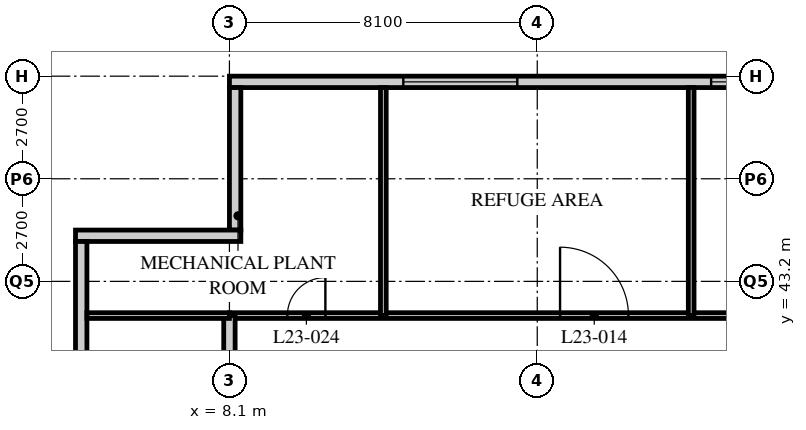
"""IFC4 building model, lengths in metres.
Left out: names, types, materials, properties, quantities, classifications, styles, units other than length and angle.
Written with IfcOpenShell. Run it as: python <this file> out.ifc"""

import sys

from ifc_helpers import new_model, si_unit, direction, frame, frame_2d, origin, place, context, subcontext, project, spatial, rectangle, extrude, element, fill, save


model = new_model("IFC4")
c1 = context("Model", 3, precision=1e-05, world=origin(), true_north=direction((0.0, 1.0)))
c2 = subcontext(c1, "Body", "Model", "MODEL_VIEW")
j1 = project(units=[si_unit("LENGTHUNIT", "METRE"), si_unit("PLANEANGLEUNIT", "RADIAN")], contexts=[c1])
p1 = place(None, origin())
s1 = spatial("IfcSite", under=j1, at=p1, CompositionType="ELEMENT")
p2 = place(p1, origin())
s2 = spatial("IfcBuilding", under=s1, at=p2, CompositionType="ELEMENT")
p3 = place(p2, frame((0.0, 0.0, 90.8)))
s3 = spatial("IfcBuildingStorey", under=s2, at=p3, CompositionType="ELEMENT", Elevation=90.8)
p4 = place(p3, frame((48.3, 48.45, 0.0), z_axis=(0.0, 0.0, 1.0), x_axis=(-1.0, 0.0, 0.0)))
e1 = element("IfcWall", 1, at=p4, inside=s3, PredefinedType="SOLIDWALL", context=c2, shape_type="SweptSolid", body=[
    extrude(rectangle(XDim=40.2, YDim=0.3, at=frame_2d((20.1, 0.0))), origin(), (0.0, 0.0, 1.0), 5.85),
])
p5 = place(p4, frame((4.275, 0.0, 1.0)))
e2 = element("IfcOpeningElement", 2, at=p5, cuts=e1, PredefinedType="OPENING", context=c2, shape_type="SweptSolid", body=[
    extrude(rectangle(XDim=3.0, YDim=1.7, at=frame_2d((1.5, 0.85))), frame((0.0, 0.16, 0.0), z_axis=(0.0, -1.0, 0.0), x_axis=(1.0, 0.0, 0.0)), (0.0, 0.0, 1.0), 0.32),
])
p6 = place(p4, frame((12.375, 0.0, 1.0)))
e3 = element("IfcOpeningElement", 3, at=p6, cuts=e1, PredefinedType="OPENING", context=c2, shape_type="SweptSolid", body=[
    extrude(rectangle(XDim=3.0, YDim=1.7, at=frame_2d((1.5, 0.85))), frame((0.0, 0.16, 0.0), z_axis=(0.0, -1.0, 0.0), x_axis=(1.0, 0.0, 0.0)), (0.0, 0.0, 1.0), 0.32),
])
p7 = place(p4, frame((24.525, 0.0, 1.0)))
e4 = element("IfcOpeningElement", 4, at=p7, cuts=e1, PredefinedType="OPENING", context=c2, shape_type="SweptSolid", body=[
    extrude(rectangle(XDim=3.0, YDim=1.7, at=frame_2d((1.5, 0.85))), frame((0.0, 0.16, 0.0), z_axis=(0.0, -1.0, 0.0), x_axis=(1.0, 0.0, 0.0)), (0.0, 0.0, 1.0), 0.32),
])
p8 = place(p4, frame((32.625, 0.0, 1.0)))
e5 = element("IfcOpeningElement", 5, at=p8, cuts=e1, PredefinedType="OPENING", context=c2, shape_type="SweptSolid", body=[
    extrude(rectangle(XDim=3.0, YDim=1.7, at=frame_2d((1.5, 0.85))), frame((0.0, 0.16, 0.0), z_axis=(0.0, -1.0, 0.0), x_axis=(1.0, 0.0, 0.0)), (0.0, 0.0, 1.0), 0.32),
])
p9 = place(p3, frame((8.25, 48.3, 0.0), z_axis=(0.0, 0.0, 1.0), x_axis=(0.0, -1.0, 0.0)))
e6 = element("IfcWall", 6, at=p9, inside=s3, PredefinedType="SOLIDWALL", context=c2, shape_type="SweptSolid", body=[
    extrude(rectangle(XDim=3.75, YDim=0.3, at=frame_2d((1.875, 0.0))), origin(), (0.0, 0.0, 1.0), 5.85),
])
p10 = place(p3, frame((8.4, 44.4, 0.0), z_axis=(0.0, 0.0, 1.0), x_axis=(-1.0, 0.0, 0.0)))
e7 = element("IfcWall", 7, at=p10, inside=s3, PredefinedType="SOLIDWALL", context=c2, shape_type="SweptSolid", body=[
    extrude(rectangle(XDim=4.35, YDim=0.3, at=frame_2d((2.175, 0.0))), origin(), (0.0, 0.0, 1.0), 6.95),
])
p11 = place(p3, frame((4.2, 44.25, 0.0), z_axis=(0.0, 0.0, 1.0), x_axis=(0.0, -1.0, 0.0)))
e8 = element("IfcWall", 8, at=p11, inside=s3, PredefinedType="SOLIDWALL", context=c2, shape_type="SweptSolid", body=[
    extrude(rectangle(XDim=3.75, YDim=0.3, at=frame_2d((1.875, 0.0))), origin(), (0.0, 0.0, 1.0), 6.95),
])
p12 = place(p3, frame((8.1, 42.3, 0.0), z_axis=(0.0, 0.0, 1.0), x_axis=(1.0, 0.0, 0.0)))
e9 = element("IfcWall", 9, at=p12, inside=s3, PredefinedType="PARTITIONING", context=c2, shape_type="SweptSolid", body=[
    extrude(rectangle(XDim=40.5, YDim=0.15, at=frame_2d((20.25, 0.0))), origin(), (0.0, 0.0, 1.0), 6.95),
])
p13 = place(p12, frame((8.7, 0.0, 0.0)))
e10 = element("IfcOpeningElement", 10, at=p13, cuts=e9, PredefinedType="OPENING", context=c2, shape_type="SweptSolid", body=[
    extrude(rectangle(XDim=1.8, YDim=2.4, at=frame_2d((0.9, 1.2))), frame((0.0, 0.085, 0.0), z_axis=(0.0, -1.0, 0.0), x_axis=(1.0, 0.0, 0.0)), (0.0, 0.0, 1.0), 0.17),
])
p14 = place(p12, frame((19.35, 0.0, 0.0)))
e11 = element("IfcOpeningElement", 11, at=p14, cuts=e9, PredefinedType="OPENING", context=c2, shape_type="SweptSolid", body=[
    extrude(rectangle(XDim=1.8, YDim=2.4, at=frame_2d((0.9, 1.2))), frame((0.0, 0.085, 0.0), z_axis=(0.0, -1.0, 0.0), x_axis=(1.0, 0.0, 0.0)), (0.0, 0.0, 1.0), 0.17),
])
p15 = place(p12, frame((33.0, 0.0, 0.0)))
e12 = element("IfcOpeningElement", 12, at=p15, cuts=e9, PredefinedType="OPENING", context=c2, shape_type="SweptSolid", body=[
    extrude(rectangle(XDim=1.8, YDim=2.4, at=frame_2d((0.9, 1.2))), frame((0.0, 0.085, 0.0), z_axis=(0.0, -1.0, 0.0), x_axis=(1.0, 0.0, 0.0)), (0.0, 0.0, 1.0), 0.17),
])
p16 = place(p12, frame((37.975, 0.0, 0.0)))
e13 = element("IfcOpeningElement", 13, at=p16, cuts=e9, PredefinedType="OPENING", context=c2, shape_type="SweptSolid", body=[
    extrude(rectangle(XDim=1.0, YDim=2.1, at=frame_2d((0.5, 1.05))), frame((0.0, 0.085, 0.0), z_axis=(0.0, -1.0, 0.0), x_axis=(1.0, 0.0, 0.0)), (0.0, 0.0, 1.0), 0.17),
])
p17 = place(p12, frame((1.525, 0.0, 0.0)))
e14 = element("IfcOpeningElement", 14, at=p17, cuts=e9, PredefinedType="OPENING", context=c2, shape_type="SweptSolid", body=[
    extrude(rectangle(XDim=1.0, YDim=2.1, at=frame_2d((0.5, 1.05))), frame((0.0, 0.085, 0.0), z_axis=(0.0, -1.0, 0.0), x_axis=(1.0, 0.0, 0.0)), (0.0, 0.0, 1.0), 0.17),
])
p18 = place(p3, frame((8.1, 8.1, 0.0), z_axis=(0.0, 0.0, 1.0), x_axis=(0.0, 1.0, 0.0)))
e15 = element("IfcWall", 15, at=p18, inside=s3, PredefinedType="PARTITIONING", context=c2, shape_type="SweptSolid", body=[
    extrude(rectangle(XDim=34.2, YDim=0.3, at=frame_2d((17.1, 0.0))), origin(), (0.0, 0.0, 1.0), 5.85),
])
p19 = place(p18, frame((2.95, 0.0, 0.0)))
e16 = element("IfcOpeningElement", 16, at=p19, cuts=e15, PredefinedType="OPENING", context=c2, shape_type="SweptSolid", body=[
    extrude(rectangle(XDim=1.8, YDim=2.4, at=frame_2d((0.9, 1.2))), frame((0.0, 0.16, 0.0), z_axis=(0.0, -1.0, 0.0), x_axis=(1.0, 0.0, 0.0)), (0.0, 0.0, 1.0), 0.32),
])
p20 = place(p18, frame((27.3, 0.0, 0.0)))
e17 = element("IfcOpeningElement", 17, at=p20, cuts=e15, PredefinedType="OPENING", context=c2, shape_type="SweptSolid", body=[
    extrude(rectangle(XDim=1.8, YDim=2.4, at=frame_2d((0.9, 1.2))), frame((0.0, 0.16, 0.0), z_axis=(0.0, -1.0, 0.0), x_axis=(1.0, 0.0, 0.0)), (0.0, 0.0, 1.0), 0.32),
])
p21 = place(p3, frame((20.25, 42.3, 0.0), z_axis=(0.0, 0.0, 1.0), x_axis=(0.0, 1.0, 0.0)))
e18 = element("IfcWall", 18, at=p21, inside=s3, PredefinedType="PARTITIONING", context=c2, shape_type="SweptSolid", body=[
    extrude(rectangle(XDim=6.0, YDim=0.15, at=frame_2d((3.0, 0.0))), origin(), (0.0, 0.0, 1.0), 6.95),
])
p22 = place(p3, frame((4.35, 42.3, 0.0), z_axis=(0.0, 0.0, 1.0), x_axis=(1.0, 0.0, 0.0)))
e19 = element("IfcWall", 19, at=p22, inside=s3, PredefinedType="PARTITIONING", context=c2, shape_type="SweptSolid", body=[
    extrude(rectangle(XDim=3.75, YDim=0.15, at=frame_2d((1.875, 0.0))), origin(), (0.0, 0.0, 1.0), 6.95),
])
p23 = place(p3, frame((12.15, 42.3, 0.0), z_axis=(0.0, 0.0, 1.0), x_axis=(0.0, 1.0, 0.0)))
e20 = element("IfcWall", 20, at=p23, inside=s3, PredefinedType="PARTITIONING", context=c2, shape_type="SweptSolid", body=[
    extrude(rectangle(XDim=6.0, YDim=0.15, at=frame_2d((3.0, 0.0))), origin(), (0.0, 0.0, 1.0), 6.95),
])
p24 = place(p7, origin())
e21 = element("IfcWindow", 21, at=p24, inside=s3, PartitioningType="SINGLE_PANEL", PredefinedType="USERDEFINED", context=c2, shape_type="SweptSolid", body=[
    extrude(rectangle(XDim=3.0, YDim=1.7, at=frame_2d((1.5, 0.85))), frame((0.0, 0.075, 0.0), z_axis=(0.0, -1.0, 0.0), x_axis=(1.0, 0.0, 0.0)), (0.0, 0.0, 1.0), 0.15),
])
fill(e4, e21)
p25 = place(p8, origin())
e22 = element("IfcWindow", 22, at=p25, inside=s3, PartitioningType="SINGLE_PANEL", PredefinedType="USERDEFINED", context=c2, shape_type="SweptSolid", body=[
    extrude(rectangle(XDim=3.0, YDim=1.7, at=frame_2d((1.5, 0.85))), frame((0.0, 0.075, 0.0), z_axis=(0.0, -1.0, 0.0), x_axis=(1.0, 0.0, 0.0)), (0.0, 0.0, 1.0), 0.15),
])
fill(e5, e22)
p26 = place(p13, origin())
e23 = element("IfcDoor", 23, at=p26, inside=s3, OperationType="DOUBLE_DOOR_SINGLE_SWING", PredefinedType="DOOR", context=c2, shape_type="SweptSolid", body=[
    extrude(rectangle(XDim=1.8, YDim=2.4, at=frame_2d((0.9, 1.2))), frame((0.0, 0.025, 0.0), z_axis=(0.0, -1.0, 0.0), x_axis=(1.0, 0.0, 0.0)), (0.0, 0.0, 1.0), 0.05),
])
fill(e10, e23)
p27 = place(p17, origin())
e24 = element("IfcDoor", 24, at=p27, inside=s3, OperationType="SINGLE_SWING_RIGHT", PredefinedType="DOOR", context=c2, shape_type="SweptSolid", body=[
    extrude(rectangle(XDim=1.0, YDim=2.1, at=frame_2d((0.5, 1.05))), frame((0.0, 0.025, 0.0), z_axis=(0.0, -1.0, 0.0), x_axis=(1.0, 0.0, 0.0)), (0.0, 0.0, 1.0), 0.05),
])
fill(e14, e24)
save(model, sys.argv[1])
